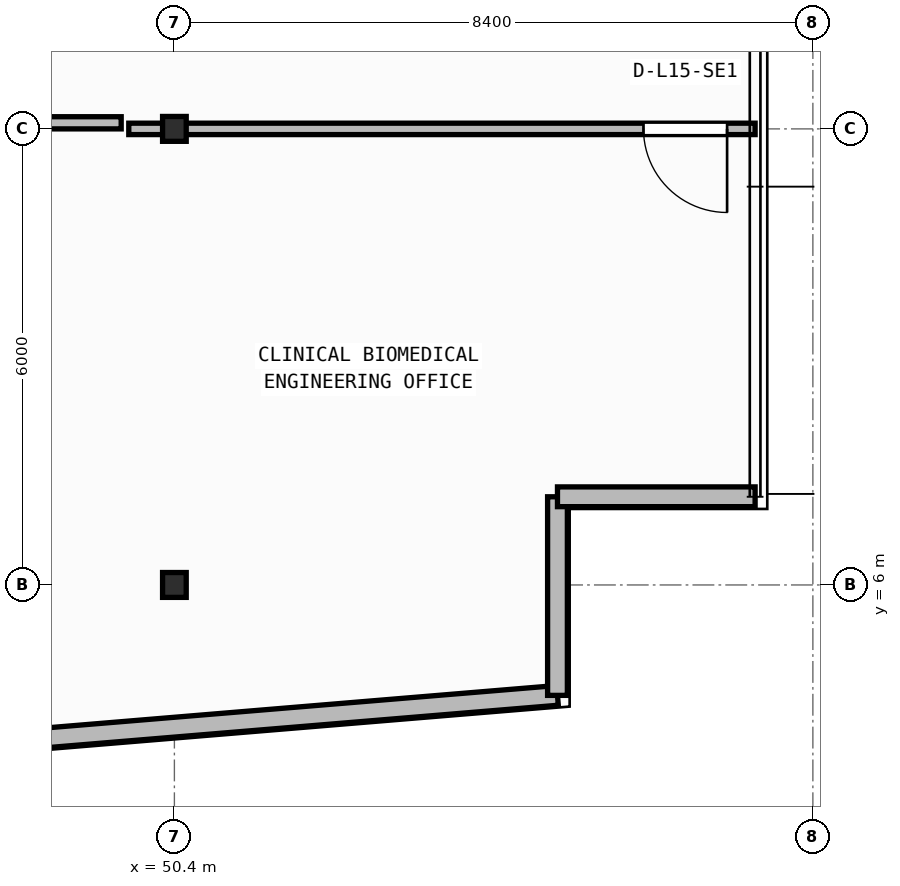
"""IFC4 building model, lengths in metres.
Left out: names, types, materials, properties, quantities, classifications, styles, units other than length and angle.
Written with IfcOpenShell. Run it as: python <this file> out.ifc"""

import sys

from ifc_helpers import new_model, si_unit, direction, frame, frame_2d, origin, origin_2d, place, context, subcontext, project, spatial, rectangle, i_section, extrude, element, fill, save


model = new_model("IFC4")
c1 = context("Model", 3, precision=1e-05, world=origin(), true_north=direction((0.0, 1.0)))
c2 = subcontext(c1, "Body", "Model", "MODEL_VIEW")
j1 = project(units=[si_unit("LENGTHUNIT", "METRE"), si_unit("PLANEANGLEUNIT", "RADIAN")], contexts=[c1])
p1 = place(None, origin())
s1 = spatial("IfcSite", under=j1, at=p1, CompositionType="ELEMENT")
p2 = place(p1, origin())
s2 = spatial("IfcBuilding", under=s1, at=p2, CompositionType="ELEMENT")
p3 = place(p2, frame((0.0, 0.0, 62.0)))
s3 = spatial("IfcBuildingStorey", under=s2, at=p3, CompositionType="ELEMENT", Elevation=62.0)
for number, where, z_axis, x_axis in (
    (1, (50.4, 6.0, 0.0), (0.0, 0.0, 1.0), (1.0, 0.0, 0.0)),
    (2, (50.4, 12.0, 0.0), (0.0, 0.0, 1.0), (1.0, 0.0, 0.0)),
):
    element("IfcColumn", number, at=place(p3, frame(where, z_axis=z_axis, x_axis=x_axis)), inside=s3, PredefinedType="COLUMN", context=c2, shape_type="SweptSolid", body=[
        extrude(i_section(OverallWidth=0.311, OverallDepth=0.327, WebThickness=0.016, FlangeThickness=0.025, FilletRadius=0.017, at=origin_2d()), origin(), (0.0, 0.0, 1.0), 3.95),
    ])
p4 = place(p3, frame((2.76, 0.174, 0.0), z_axis=(0.0, 0.0, 1.0), x_axis=(0.996571478456, 0.082736257641, 0.0)))
e3 = element("IfcWall", 3, at=p4, inside=s3, PredefinedType="STANDARD", context=c2, shape_type="SweptSolid", body=[
    extrude(rectangle(XDim=52.861, YDim=0.26, at=frame_2d((26.431, 0.0))), origin(), (0.0, 0.0, 1.0), 3.71),
])
p5 = place(p4, frame((25.231, 0.0, 0.9)))
e4 = element("IfcOpeningElement", 4, at=p5, cuts=e3, PredefinedType="OPENING", context=c2, shape_type="SweptSolid", body=[
    extrude(rectangle(XDim=2.4, YDim=1.65, at=frame_2d((1.2, 0.825))), frame((0.0, 0.14, 0.0), z_axis=(0.0, -1.0, 0.0), x_axis=(1.0, 0.0, 0.0)), (0.0, 0.0, 1.0), 0.28),
])
p6 = place(p3, frame((55.44, 4.547, 0.0), z_axis=(0.0, 0.0, 1.0), x_axis=(0.0, 1.0, 0.0)))
e5 = element("IfcWall", 5, at=p6, inside=s3, PredefinedType="STANDARD", context=c2, shape_type="SweptSolid", body=[
    extrude(rectangle(XDim=2.613, YDim=0.26, at=frame_2d((1.306, 0.0))), origin(), (0.0, 0.0, 1.0), 3.71),
])
p7 = place(p3, frame((55.44, 7.16, 0.0), z_axis=(0.0, 0.0, 1.0), x_axis=(1.0, 0.0, 0.0)))
e6 = element("IfcWall", 6, at=p7, inside=s3, PredefinedType="STANDARD", context=c2, shape_type="SweptSolid", body=[
    extrude(rectangle(XDim=2.6, YDim=0.26, at=frame_2d((1.3, 0.0))), origin(), (0.0, 0.0, 1.0), 3.71),
])
p8 = place(p3, frame((58.04, 12.0, 0.0), z_axis=(0.0, 0.0, 1.0), x_axis=(-1.0, 0.0, 0.0)))
e7 = element("IfcWall", 7, at=p8, inside=s3, PredefinedType="PARTITIONING", context=c2, shape_type="SweptSolid", body=[
    extrude(rectangle(XDim=8.24, YDim=0.15, at=frame_2d((4.12, 0.0))), origin(), (0.0, 0.0, 1.0), 3.073),
])
p9 = place(p8, frame((0.368, 0.0, 0.0)))
e8 = element("IfcOpeningElement", 8, at=p9, cuts=e7, PredefinedType="OPENING", context=c2, shape_type="SweptSolid", body=[
    extrude(rectangle(XDim=1.1, YDim=2.1, at=frame_2d((0.55, 1.05))), frame((0.0, 0.085, 0.0), z_axis=(0.0, -1.0, 0.0), x_axis=(1.0, 0.0, 0.0)), (0.0, 0.0, 1.0), 0.17),
])
p10 = place(p3, frame((46.689, 12.08, 0.0), z_axis=(0.0, 0.0, 1.0), x_axis=(1.0, 0.0, 0.0)))
e9 = element("IfcWall", 9, at=p10, inside=s3, PredefinedType="PARTITIONING", context=c2, shape_type="SweptSolid", body=[
    extrude(rectangle(XDim=3.011, YDim=0.16, at=frame_2d((1.505, 0.0))), origin(), (0.0, 0.0, 1.0), 3.073),
])
p11 = place(p9, origin())
e10 = element("IfcDoor", 10, at=p11, inside=s3, OperationType="SINGLE_SWING_LEFT", PredefinedType="DOOR", context=c2, shape_type="SweptSolid", body=[
    extrude(rectangle(XDim=1.1, YDim=2.1, at=frame_2d((0.55, 1.05))), frame((0.0, 0.025, 0.0), z_axis=(0.0, -1.0, 0.0), x_axis=(1.0, 0.0, 0.0)), (0.0, 0.0, 1.0), 0.05),
])
fill(e8, e10)
save(model, sys.argv[1])
